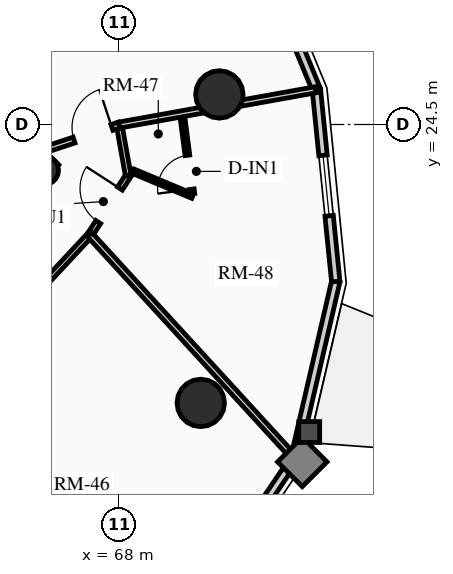
"""IFC4 building model, lengths in metres.
Left out: names, types, materials, properties, quantities, classifications, styles, units other than length and angle.
Written with IfcOpenShell. Run it as: python <this file> out.ifc"""

import sys

from ifc_helpers import new_model, si_unit, direction, frame, frame_2d, origin, origin_2d, place, context, subcontext, project, spatial, rectangle, circle, hollow_circle, extrude, source, transform, mapped, element, fill, save


model = new_model("IFC4")
c1 = context("Model", 3, precision=1e-05, world=origin(), true_north=direction((0.0, 1.0)))
c2 = subcontext(c1, "Body", "Model", "MODEL_VIEW")
j1 = project(units=[si_unit("LENGTHUNIT", "METRE"), si_unit("PLANEANGLEUNIT", "RADIAN")], contexts=[c1])
p1 = place(None, origin())
s1 = spatial("IfcSite", under=j1, at=p1, CompositionType="ELEMENT")
p2 = place(p1, origin())
s2 = spatial("IfcBuilding", under=s1, at=p2, CompositionType="ELEMENT")
p3 = place(p2, frame((0.0, 0.0, 151.6)))
s3 = spatial("IfcBuildingStorey", under=s2, at=p3, CompositionType="ELEMENT", Elevation=151.6)
p4 = place(p3, frame((66.268, 23.298, 0.0), z_axis=(0.0, 0.0, 1.0), x_axis=(-0.707106781187, 0.707106781187, 0.0)))
e1 = element("IfcWall", 1, at=p4, inside=s3, PredefinedType="SHEAR", context=c2, shape_type="SweptSolid", body=[
    extrude(rectangle(XDim=14.1, YDim=0.4, at=frame_2d((7.05, 0.0))), origin(), (0.0, 0.0, 1.0), 2.91),
])
p5 = place(p3, frame((58.561, 15.873, 0.0), z_axis=(0.0, 0.0, 1.0), x_axis=(0.707106781187, 0.707106781187, 0.0)))
e2 = element("IfcWall", 2, at=p5, inside=s3, PredefinedType="SHEAR", context=c2, shape_type="SweptSolid", body=[
    extrude(rectangle(XDim=10.7, YDim=0.4, at=frame_2d((5.35, 0.0))), origin(), (0.0, 0.0, 1.0), 2.91),
])
m1 = source(origin(), c2, "Body", "SweptSolid", [
    extrude(rectangle(XDim=1.5, YDim=2.02, at=frame_2d((0.75, 1.01))), frame((0.0, 0.21, 0.0), z_axis=(0.0, -1.0, 0.0), x_axis=(1.0, 0.0, 0.0)), (0.0, 0.0, 1.0), 0.42),
])
p6 = place(p5, frame((5.45, 0.0, 0.0)))
e3 = element("IfcOpeningElement", 3, at=p6, cuts=e2, PredefinedType="OPENING", context=c2, shape_type="MappedRepresentation", body=[
    mapped(m1, transform((0.0, 0.0, 0.0), x_axis=(1.0, 0.0, 0.0), y_axis=(0.0, 1.0, 0.0), z_axis=(0.0, 0.0, 1.0), scale=1.0)),
])
p7 = place(p3, frame((66.024, 23.294, 0.0), z_axis=(0.0, 0.0, 1.0), x_axis=(0.707106781187, 0.707106781187, 0.0)))
e4 = element("IfcColumn", 4, at=p7, inside=s3, PredefinedType="COLUMN", context=c2, shape_type="SweptSolid", body=[
    extrude(hollow_circle(Radius=0.38, WallThickness=0.032, at=origin_2d()), origin(), (0.0, 0.0, 1.0), 2.91),
])
for number, where, z_axis, x_axis in (
    (5, (70.146, 17.173, 0.0), (0.0, 0.0, 1.0), (1.0, 0.0, 0.0)),
    (6, (70.635, 25.291, 0.0), (0.0, 0.0, 1.0), (1.0, 0.0, 0.0)),
):
    element("IfcColumn", number, at=place(p3, frame(where, z_axis=z_axis, x_axis=x_axis)), inside=s3, PredefinedType="USERDEFINED", context=c2, shape_type="SweptSolid", body=[
        extrude(circle(Radius=0.625, at=origin_2d()), origin(), (0.0, 0.0, 1.0), 2.91),
    ])
p8 = place(p3, frame((72.622, 15.721, 0.0), z_axis=(0.0, 0.0, 1.0), x_axis=(-0.559635286042, -0.828739009952, 0.0)))
e7 = element("IfcWall", 7, at=p8, inside=s3, PredefinedType="SOLIDWALL", context=c2, shape_type="SweptSolid", body=[
    extrude(rectangle(XDim=4.569, YDim=0.22, at=frame_2d((2.284, 0.0))), origin(), (0.0, 0.0, 1.0), 2.245),
])
m2 = source(origin(), c2, "Body", "SweptSolid", [
    extrude(rectangle(XDim=1.6, YDim=1.3, at=frame_2d((0.8, 0.65))), frame((0.0, 0.12, 0.0), z_axis=(0.0, -1.0, 0.0), x_axis=(1.0, 0.0, 0.0)), (0.0, 0.0, 1.0), 0.24),
])
p9 = place(p8, frame((1.484, 0.0, 0.65)))
e8 = element("IfcOpeningElement", 8, at=p9, cuts=e7, PredefinedType="OPENING", context=c2, shape_type="MappedRepresentation", body=[
    mapped(m2, transform((0.0, 0.0, 0.0), x_axis=(1.0, 0.0, 0.0), y_axis=(0.0, 1.0, 0.0), z_axis=(0.0, 0.0, 1.0), scale=1.0)),
])
p10 = place(p3, frame((73.698, 20.367, 0.0), z_axis=(0.0, 0.0, 1.0), x_axis=(-0.225659540039, -0.974206226622, 0.0)))
e9 = element("IfcWall", 9, at=p10, inside=s3, PredefinedType="SOLIDWALL", context=c2, shape_type="SweptSolid", body=[
    extrude(rectangle(XDim=4.769, YDim=0.22, at=frame_2d((2.385, 0.0))), origin(), (0.0, 0.0, 1.0), 2.245),
])
p11 = place(p3, frame((73.189, 25.418, 0.0), z_axis=(0.0, 0.0, 1.0), x_axis=(0.100279889424, -0.994959267396, 0.0)))
e10 = element("IfcWall", 10, at=p11, inside=s3, PredefinedType="SOLIDWALL", context=c2, shape_type="SweptSolid", body=[
    extrude(rectangle(XDim=5.076, YDim=0.22, at=frame_2d((2.538, 0.0))), origin(), (0.0, 0.0, 1.0), 2.245),
])
p12 = place(p11, frame((1.738, 0.0, 0.65)))
e11 = element("IfcOpeningElement", 11, at=p12, cuts=e10, PredefinedType="OPENING", context=c2, shape_type="MappedRepresentation", body=[
    mapped(m2, transform((0.0, 0.0, 0.0), x_axis=(1.0, 0.0, 0.0), y_axis=(0.0, 1.0, 0.0), z_axis=(0.0, 0.0, 1.0), scale=1.0)),
])
p13 = place(p3, frame((71.144, 30.378, 0.0), z_axis=(0.0, 0.0, 1.0), x_axis=(0.38111364655, -0.924528197738, 0.0)))
e12 = element("IfcWall", 12, at=p13, inside=s3, PredefinedType="SOLIDWALL", context=c2, shape_type="SweptSolid", body=[
    extrude(rectangle(XDim=5.366, YDim=0.22, at=frame_2d((2.683, 0.0))), origin(), (0.0, 0.0, 1.0), 2.245),
])
p14 = place(p3, frame((62.784, 16.83, 0.0), z_axis=(0.0, 0.0, 1.0), x_axis=(0.682240832942, 0.731127516831, 0.0)))
e13 = element("IfcWall", 13, at=p14, inside=s3, PredefinedType="PARTITIONING", context=c2, shape_type="SweptSolid", body=[
    extrude(rectangle(XDim=6.517, YDim=0.15, at=frame_2d((3.259, 0.0))), origin(), (0.0, 0.0, 1.0), 2.245),
])
m3 = source(origin(), c2, "Body", "SweptSolid", [
    extrude(rectangle(XDim=1.05, YDim=2.015, at=frame_2d((0.525, 1.007))), frame((0.0, 0.085, 0.0), z_axis=(0.0, -1.0, 0.0), x_axis=(1.0, 0.0, 0.0)), (0.0, 0.0, 1.0), 0.17),
])
p15 = place(p14, frame((2.734, 0.0, 0.0)))
e14 = element("IfcOpeningElement", 14, at=p15, cuts=e13, PredefinedType="OPENING", context=c2, shape_type="MappedRepresentation", body=[
    mapped(m3, transform((0.0, 0.0, 0.0), x_axis=(1.0, 0.0, 0.0), y_axis=(0.0, 1.0, 0.0), z_axis=(0.0, 0.0, 1.0), scale=1.0)),
])
p16 = place(p3, frame((67.23, 21.595, 0.0), z_axis=(0.0, 0.0, 1.0), x_axis=(0.543687770222, 0.839287560084, 0.0)))
e15 = element("IfcWall", 15, at=p16, inside=s3, PredefinedType="PARTITIONING", context=c2, shape_type="SweptSolid", body=[
    extrude(rectangle(XDim=1.855, YDim=0.15, at=frame_2d((0.927, 0.0))), origin(), (0.0, 0.0, 1.0), 2.245),
])
p17 = place(p16, frame((0.402, 0.0, 0.0)))
e16 = element("IfcOpeningElement", 16, at=p17, cuts=e15, PredefinedType="OPENING", context=c2, shape_type="MappedRepresentation", body=[
    mapped(m3, transform((0.0, 0.0, 0.0), x_axis=(1.0, 0.0, 0.0), y_axis=(0.0, 1.0, 0.0), z_axis=(0.0, 0.0, 1.0), scale=1.0)),
])
p18 = place(p3, frame((68.239, 23.152, 0.0), z_axis=(0.0, 0.0, 1.0), x_axis=(-0.177076146115, 0.984197154272, 0.0)))
e17 = element("IfcWall", 17, at=p18, inside=s3, PredefinedType="PARTITIONING", context=c2, shape_type="SweptSolid", body=[
    extrude(rectangle(XDim=1.354, YDim=0.15, at=frame_2d((0.677, 0.0))), origin(), (0.0, 0.0, 1.0), 2.245),
])
p19 = place(p3, frame((67.23, 21.595, 0.0), z_axis=(0.0, 0.0, 1.0), x_axis=(0.67560509773, -0.737263692258, 0.0)))
e18 = element("IfcWall", 18, at=p19, inside=s3, PredefinedType="PARTITIONING", context=c2, shape_type="SweptSolid", body=[
    extrude(rectangle(XDim=7.955, YDim=0.16, at=frame_2d((3.978, 0.0))), origin(), (0.0, 0.0, 1.0), 2.245),
])
p20 = place(p3, frame((67.999, 24.485, 0.0), z_axis=(0.0, 0.0, 1.0), x_axis=(0.984209402602, 0.177008055834, 0.0)))
e19 = element("IfcWall", 19, at=p20, inside=s3, PredefinedType="PARTITIONING", context=c2, shape_type="SweptSolid", body=[
    extrude(rectangle(XDim=5.254, YDim=0.16, at=frame_2d((2.627, 0.0))), origin(), (0.0, 0.0, 1.0), 2.245),
])
p21 = place(p3, frame((66.021, 23.828, 0.0), z_axis=(0.0, 0.0, 1.0), x_axis=(0.949104122534, 0.314962481241, 0.0)))
e20 = element("IfcWall", 20, at=p21, inside=s3, PredefinedType="PARTITIONING", context=c2, shape_type="SweptSolid", body=[
    extrude(rectangle(XDim=2.084, YDim=0.16, at=frame_2d((1.042, 0.0))), origin(), (0.0, 0.0, 1.0), 2.245),
])
m4 = source(origin(), c2, "Body", "SweptSolid", [
    extrude(rectangle(XDim=1.05, YDim=2.015, at=frame_2d((0.525, 1.007))), frame((0.0, 0.09, 0.0), z_axis=(0.0, -1.0, 0.0), x_axis=(1.0, 0.0, 0.0)), (0.0, 0.0, 1.0), 0.18),
])
p22 = place(p21, frame((0.834, 0.0, 0.0)))
e21 = element("IfcOpeningElement", 21, at=p22, cuts=e20, PredefinedType="OPENING", context=c2, shape_type="MappedRepresentation", body=[
    mapped(m4, transform((0.0, 0.0, 0.0), x_axis=(1.0, 0.0, 0.0), y_axis=(0.0, 1.0, 0.0), z_axis=(0.0, 0.0, 1.0), scale=1.0)),
])
p23 = place(p3, frame((68.367, 23.271, 0.0), z_axis=(0.0, 0.0, 1.0), x_axis=(0.922420747941, -0.386186436541, 0.0)))
e22 = element("IfcWall", 22, at=p23, inside=s3, PredefinedType="PARTITIONING", context=c2, shape_type="SweptSolid", body=[
    extrude(rectangle(XDim=1.699, YDim=0.125, at=frame_2d((0.849, 0.0))), origin(), (0.0, 0.0, 1.0), 2.312),
])
p24 = place(p3, frame((69.926, 22.678, 0.0), z_axis=(0.0, 0.0, 1.0), x_axis=(-0.128245661315, 0.991742431458, 0.0)))
e23 = element("IfcWall", 23, at=p24, inside=s3, PredefinedType="PARTITIONING", context=c2, shape_type="SweptSolid", body=[
    extrude(rectangle(XDim=2.033, YDim=0.125, at=frame_2d((1.017, 0.0))), origin(), (0.0, 0.0, 1.0), 2.312),
])
m5 = source(origin(), c2, "Body", "SweptSolid", [
    extrude(rectangle(XDim=0.9, YDim=2.005, at=frame_2d((0.45, 1.002))), frame((0.0, 0.073, 0.0), z_axis=(0.0, -1.0, 0.0), x_axis=(1.0, 0.0, 0.0)), (0.0, 0.0, 1.0), 0.145),
])
p25 = place(p24, frame((0.12, 0.0, 0.0)))
e24 = element("IfcOpeningElement", 24, at=p25, cuts=e23, PredefinedType="OPENING", context=c2, shape_type="MappedRepresentation", body=[
    mapped(m5, transform((0.0, 0.0, 0.0), x_axis=(1.0, 0.0, 0.0), y_axis=(0.0, 1.0, 0.0), z_axis=(0.0, 0.0, 1.0), scale=1.0)),
])
m6 = source(origin(), c2, "Body", "SweptSolid", [
    extrude(rectangle(XDim=1.6, YDim=1.3, at=frame_2d((0.8, 0.65))), frame((0.0, 0.03, 0.0), z_axis=(0.0, -1.0, 0.0), x_axis=(1.0, 0.0, 0.0)), (0.0, 0.0, 1.0), 0.06),
])
p26 = place(p12, origin())
e25 = element("IfcWindow", 25, at=p26, inside=s3, PartitioningType="SINGLE_PANEL", PredefinedType="WINDOW", context=c2, shape_type="MappedRepresentation", body=[
    mapped(m6, transform((0.0, 0.0, 0.0), x_axis=(1.0, 0.0, 0.0), y_axis=(0.0, 1.0, 0.0), z_axis=(0.0, 0.0, 1.0), scale=1.0)),
])
fill(e11, e25)
m7 = source(origin(), c2, "Body", "SweptSolid", [
    extrude(rectangle(XDim=1.05, YDim=2.015, at=frame_2d((0.525, 1.007))), frame((0.0, 0.025, 0.0), z_axis=(0.0, -1.0, 0.0), x_axis=(1.0, 0.0, 0.0)), (0.0, 0.0, 1.0), 0.05),
])
p27 = place(p22, origin())
e26 = element("IfcDoor", 26, at=p27, inside=s3, OperationType="SINGLE_SWING_RIGHT", PredefinedType="DOOR", context=c2, shape_type="MappedRepresentation", body=[
    mapped(m7, transform((0.0, 0.0, 0.0), x_axis=(1.0, 0.0, 0.0), y_axis=(0.0, 1.0, 0.0), z_axis=(0.0, 0.0, 1.0), scale=1.0)),
])
fill(e21, e26)
p28 = place(p17, origin())
e27 = element("IfcDoor", 27, at=p28, inside=s3, OperationType="SINGLE_SWING_RIGHT", PredefinedType="DOOR", context=c2, shape_type="MappedRepresentation", body=[
    mapped(m7, transform((0.0, 0.0, 0.0), x_axis=(1.0, 0.0, 0.0), y_axis=(0.0, 1.0, 0.0), z_axis=(0.0, 0.0, 1.0), scale=1.0)),
])
fill(e16, e27)
m8 = source(origin(), c2, "Body", "SweptSolid", [
    extrude(rectangle(XDim=0.9, YDim=2.005, at=frame_2d((0.45, 1.002))), frame((0.0, 0.025, 0.0), z_axis=(0.0, -1.0, 0.0), x_axis=(1.0, 0.0, 0.0)), (0.0, 0.0, 1.0), 0.05),
])
p29 = place(p25, origin())
e28 = element("IfcDoor", 28, at=p29, inside=s3, OperationType="SINGLE_SWING_LEFT", PredefinedType="DOOR", context=c2, shape_type="MappedRepresentation", body=[
    mapped(m8, transform((0.0, 0.0, 0.0), x_axis=(1.0, 0.0, 0.0), y_axis=(0.0, 1.0, 0.0), z_axis=(0.0, 0.0, 1.0), scale=1.0)),
])
fill(e24, e28)
save(model, sys.argv[1])
